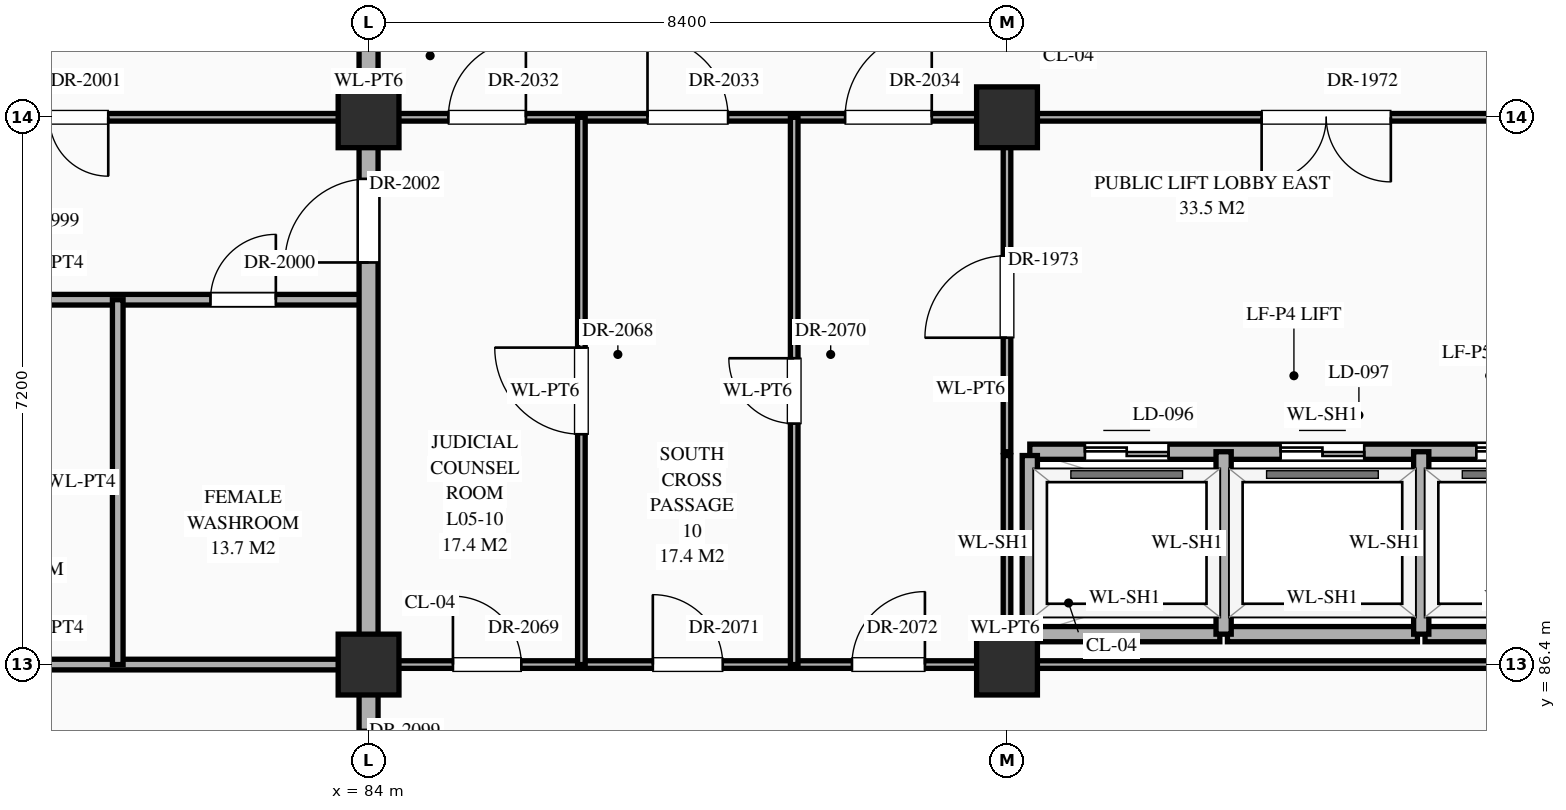
"""IFC4 building model, lengths in metres.
Left out: names, types, materials, properties, quantities, classifications, styles, units other than length and angle.
Written with IfcOpenShell. Run it as: python <this file> out.ifc"""

import sys

from ifc_helpers import new_model, si_unit, direction, frame, frame_2d, origin, origin_2d, place, context, subcontext, project, spatial, rectangle, extrude, element, fill, save


model = new_model("IFC4")
c1 = context("Model", 3, precision=1e-05, world=origin(), true_north=direction((0.0, 1.0)))
c2 = subcontext(c1, "Body", "Model", "MODEL_VIEW")
j1 = project(units=[si_unit("LENGTHUNIT", "METRE"), si_unit("PLANEANGLEUNIT", "RADIAN")], contexts=[c1])
p1 = place(None, origin())
s1 = spatial("IfcSite", under=j1, at=p1, CompositionType="ELEMENT")
p2 = place(p1, origin())
s2 = spatial("IfcBuilding", under=s1, at=p2, CompositionType="ELEMENT")
p3 = place(p2, frame((0.0, 0.0, 21.6)))
s3 = spatial("IfcBuildingStorey", under=s2, at=p3, CompositionType="ELEMENT", Elevation=21.6)
for number, where, z_axis, x_axis in (
    (1, (84.0, 86.4, 0.0), (0.0, 0.0, 1.0), (1.0, 0.0, 0.0)),
    (2, (84.0, 93.6, 0.0), (0.0, 0.0, 1.0), (1.0, 0.0, 0.0)),
    (3, (92.4, 86.4, 0.0), (0.0, 0.0, 1.0), (1.0, 0.0, 0.0)),
    (4, (92.4, 93.6, 0.0), (0.0, 0.0, 1.0), (1.0, 0.0, 0.0)),
):
    element("IfcColumn", number, at=place(p3, frame(where, z_axis=z_axis, x_axis=x_axis)), inside=s3, PredefinedType="COLUMN", context=c2, shape_type="SweptSolid", body=[
        extrude(rectangle(XDim=0.8, YDim=0.8, at=origin_2d()), origin(), (0.0, 0.0, 1.0), 4.5),
    ])
p4 = place(p3, frame((75.6, 86.4, 0.0), z_axis=(0.0, 0.0, 1.0), x_axis=(1.0, 0.0, 0.0)))
e5 = element("IfcWall", 5, at=p4, inside=s3, PredefinedType="STANDARD", context=c2, shape_type="SweptSolid", body=[
    extrude(rectangle(XDim=8.4, YDim=0.14, at=frame_2d((4.2, 0.0))), origin(), (0.0, 0.0, 1.0), 3.39),
])
p5 = place(p3, frame((84.0, 86.4, 0.0), z_axis=(0.0, 0.0, 1.0), x_axis=(1.0, 0.0, 0.0)))
e6 = element("IfcWall", 6, at=p5, inside=s3, PredefinedType="STANDARD", context=c2, shape_type="SweptSolid", body=[
    extrude(rectangle(XDim=8.4, YDim=0.1, at=frame_2d((4.2, 0.0))), origin(), (0.0, 0.0, 1.0), 3.39),
])
p6 = place(p5, frame((1.11, 0.0, 0.0)))
e7 = element("IfcOpeningElement", 7, at=p6, cuts=e6, PredefinedType="OPENING", context=c2, shape_type="SweptSolid", body=[
    extrude(rectangle(XDim=0.9, YDim=2.15, at=frame_2d((0.45, 1.075))), frame((0.0, 0.062, 0.0), z_axis=(0.0, -1.0, 0.0), x_axis=(1.0, 0.0, 0.0)), (0.0, 0.0, 1.0), 0.124),
])
p7 = place(p5, frame((3.74, 0.0, 0.0)))
e8 = element("IfcOpeningElement", 8, at=p7, cuts=e6, PredefinedType="OPENING", context=c2, shape_type="SweptSolid", body=[
    extrude(rectangle(XDim=0.92, YDim=2.15, at=frame_2d((0.46, 1.075))), frame((0.0, 0.062, 0.0), z_axis=(0.0, -1.0, 0.0), x_axis=(1.0, 0.0, 0.0)), (0.0, 0.0, 1.0), 0.124),
])
p8 = place(p5, frame((6.36, 0.0, 0.0)))
e9 = element("IfcOpeningElement", 9, at=p8, cuts=e6, PredefinedType="OPENING", context=c2, shape_type="SweptSolid", body=[
    extrude(rectangle(XDim=0.96, YDim=2.2, at=frame_2d((0.48, 1.1))), frame((0.0, 0.062, 0.0), z_axis=(0.0, -1.0, 0.0), x_axis=(1.0, 0.0, 0.0)), (0.0, 0.0, 1.0), 0.124),
])
p9 = place(p3, frame((92.45, 86.4, 0.0), z_axis=(0.0, 0.0, 1.0), x_axis=(1.0, 0.0, 0.0)))
e10 = element("IfcWall", 10, at=p9, inside=s3, PredefinedType="STANDARD", context=c2, shape_type="SweptSolid", body=[
    extrude(rectangle(XDim=8.3, YDim=0.1, at=frame_2d((4.15, 0.0))), origin(), (0.0, 0.0, 1.0), 3.39),
])
for number, where, z_axis, x_axis in (
    (11, (92.7, 86.8, 0.0), (0.0, 0.0, 1.0), (1.0, 0.0, 0.0)),
    (12, (95.3, 86.8, 0.0), (0.0, 0.0, 1.0), (1.0, 0.0, 0.0)),
    (13, (97.9, 86.8, 0.0), (0.0, 0.0, 1.0), (1.0, 0.0, 0.0)),
):
    element("IfcWall", number, at=place(p3, frame(where, z_axis=z_axis, x_axis=x_axis)), inside=s3, PredefinedType="STANDARD", context=c2, shape_type="SweptSolid", body=[
        extrude(rectangle(XDim=2.5, YDim=0.2, at=frame_2d((1.25, 0.0))), origin(), (0.0, 0.0, 1.0), 4.24),
    ])
p10 = place(p3, frame((92.7, 89.2, 0.0), z_axis=(0.0, 0.0, 1.0), x_axis=(1.0, 0.0, 0.0)))
e14 = element("IfcWall", 14, at=p10, inside=s3, PredefinedType="STANDARD", context=c2, shape_type="SweptSolid", body=[
    extrude(rectangle(XDim=7.7, YDim=0.2, at=frame_2d((3.85, 0.0))), origin(), (0.0, 0.0, 1.0), 4.24),
])
p11 = place(p10, frame((0.725, 0.0, 0.0)))
e15 = element("IfcOpeningElement", 15, at=p11, cuts=e14, PredefinedType="OPENING", context=c2, shape_type="SweptSolid", body=[
    extrude(rectangle(XDim=1.1, YDim=2.15, at=frame_2d((0.55, 1.075))), frame((0.0, 0.112, 0.0), z_axis=(0.0, -1.0, 0.0), x_axis=(1.0, 0.0, 0.0)), (0.0, 0.0, 1.0), 0.224),
])
p12 = place(p10, frame((3.3, 0.0, 0.0)))
e16 = element("IfcOpeningElement", 16, at=p12, cuts=e14, PredefinedType="OPENING", context=c2, shape_type="SweptSolid", body=[
    extrude(rectangle(XDim=1.1, YDim=2.15, at=frame_2d((0.55, 1.075))), frame((0.0, 0.112, 0.0), z_axis=(0.0, -1.0, 0.0), x_axis=(1.0, 0.0, 0.0)), (0.0, 0.0, 1.0), 0.224),
])
p13 = place(p10, frame((5.875, 0.0, 0.0)))
e17 = element("IfcOpeningElement", 17, at=p13, cuts=e14, PredefinedType="OPENING", context=c2, shape_type="SweptSolid", body=[
    extrude(rectangle(XDim=1.1, YDim=2.15, at=frame_2d((0.55, 1.075))), frame((0.0, 0.112, 0.0), z_axis=(0.0, -1.0, 0.0), x_axis=(1.0, 0.0, 0.0)), (0.0, 0.0, 1.0), 0.224),
])
p14 = place(p3, frame((75.6, 91.2, 0.0), z_axis=(0.0, 0.0, 1.0), x_axis=(1.0, 0.0, 0.0)))
e18 = element("IfcWall", 18, at=p14, inside=s3, PredefinedType="STANDARD", context=c2, shape_type="SweptSolid", body=[
    extrude(rectangle(XDim=8.4, YDim=0.14, at=frame_2d((4.2, 0.0))), origin(), (0.0, 0.0, 1.0), 4.24),
])
p15 = place(p14, frame((0.65, 0.0, 0.0)))
e19 = element("IfcOpeningElement", 19, at=p15, cuts=e18, PredefinedType="OPENING", context=c2, shape_type="SweptSolid", body=[
    extrude(rectangle(XDim=0.9, YDim=2.15, at=frame_2d((0.45, 1.075))), frame((0.0, 0.082, 0.0), z_axis=(0.0, -1.0, 0.0), x_axis=(1.0, 0.0, 0.0)), (0.0, 0.0, 1.0), 0.164),
])
p16 = place(p14, frame((3.22, 0.0, 0.0)))
e20 = element("IfcOpeningElement", 20, at=p16, cuts=e18, PredefinedType="OPENING", context=c2, shape_type="SweptSolid", body=[
    extrude(rectangle(XDim=0.86, YDim=2.1, at=frame_2d((0.43, 1.05))), frame((0.0, 0.082, 0.0), z_axis=(0.0, -1.0, 0.0), x_axis=(1.0, 0.0, 0.0)), (0.0, 0.0, 1.0), 0.164),
])
p17 = place(p14, frame((6.32, 0.0, 0.0)))
e21 = element("IfcOpeningElement", 21, at=p17, cuts=e18, PredefinedType="OPENING", context=c2, shape_type="SweptSolid", body=[
    extrude(rectangle(XDim=0.86, YDim=2.1, at=frame_2d((0.43, 1.05))), frame((0.0, 0.082, 0.0), z_axis=(0.0, -1.0, 0.0), x_axis=(1.0, 0.0, 0.0)), (0.0, 0.0, 1.0), 0.164),
])
p18 = place(p3, frame((67.2, 93.6, 0.0), z_axis=(0.0, 0.0, 1.0), x_axis=(1.0, 0.0, 0.0)))
e22 = element("IfcWall", 22, at=p18, inside=s3, PredefinedType="STANDARD", context=c2, shape_type="SweptSolid", body=[
    extrude(rectangle(XDim=33.6, YDim=0.1, at=frame_2d((16.8, 0.0))), origin(), (0.0, 0.0, 1.0), 3.39),
])
p19 = place(p18, frame((3.425, 0.0, 0.0)))
e23 = element("IfcOpeningElement", 23, at=p19, cuts=e22, PredefinedType="OPENING", context=c2, shape_type="SweptSolid", body=[
    extrude(rectangle(XDim=1.55, YDim=2.35, at=frame_2d((0.775, 1.175))), frame((0.0, 0.062, 0.0), z_axis=(0.0, -1.0, 0.0), x_axis=(1.0, 0.0, 0.0)), (0.0, 0.0, 1.0), 0.124),
])
p20 = place(p18, frame((28.55, 0.0, 0.0)))
e24 = element("IfcOpeningElement", 24, at=p20, cuts=e22, PredefinedType="OPENING", context=c2, shape_type="SweptSolid", body=[
    extrude(rectangle(XDim=1.7, YDim=2.45, at=frame_2d((0.85, 1.225))), frame((0.0, 0.062, 0.0), z_axis=(0.0, -1.0, 0.0), x_axis=(1.0, 0.0, 0.0)), (0.0, 0.0, 1.0), 0.124),
])
p21 = place(p18, frame((11.825, 0.0, 0.0)))
e25 = element("IfcOpeningElement", 25, at=p21, cuts=e22, PredefinedType="OPENING", context=c2, shape_type="SweptSolid", body=[
    extrude(rectangle(XDim=1.55, YDim=2.35, at=frame_2d((0.775, 1.175))), frame((0.0, 0.062, 0.0), z_axis=(0.0, -1.0, 0.0), x_axis=(1.0, 0.0, 0.0)), (0.0, 0.0, 1.0), 0.124),
])
p22 = place(p18, frame((17.85, 0.0, 0.0)))
e26 = element("IfcOpeningElement", 26, at=p22, cuts=e22, PredefinedType="OPENING", context=c2, shape_type="SweptSolid", body=[
    extrude(rectangle(XDim=1.02, YDim=2.4, at=frame_2d((0.51, 1.2))), frame((0.0, 0.062, 0.0), z_axis=(0.0, -1.0, 0.0), x_axis=(1.0, 0.0, 0.0)), (0.0, 0.0, 1.0), 0.124),
])
p23 = place(p18, frame((20.47, 0.0, 0.0)))
e27 = element("IfcOpeningElement", 27, at=p23, cuts=e22, PredefinedType="OPENING", context=c2, shape_type="SweptSolid", body=[
    extrude(rectangle(XDim=1.06, YDim=2.4, at=frame_2d((0.53, 1.2))), frame((0.0, 0.062, 0.0), z_axis=(0.0, -1.0, 0.0), x_axis=(1.0, 0.0, 0.0)), (0.0, 0.0, 1.0), 0.124),
])
p24 = place(p18, frame((23.07, 0.0, 0.0)))
e28 = element("IfcOpeningElement", 28, at=p24, cuts=e22, PredefinedType="OPENING", context=c2, shape_type="SweptSolid", body=[
    extrude(rectangle(XDim=1.14, YDim=2.4, at=frame_2d((0.57, 1.2))), frame((0.0, 0.062, 0.0), z_axis=(0.0, -1.0, 0.0), x_axis=(1.0, 0.0, 0.0)), (0.0, 0.0, 1.0), 0.124),
])
p25 = place(p3, frame((80.7, 86.4, 0.0), z_axis=(0.0, 0.0, 1.0), x_axis=(0.0, 1.0, 0.0)))
e29 = element("IfcWall", 29, at=p25, inside=s3, PredefinedType="STANDARD", context=c2, shape_type="SweptSolid", body=[
    extrude(rectangle(XDim=4.8, YDim=0.14, at=frame_2d((2.4, 0.0))), origin(), (0.0, 0.0, 1.0), 4.24),
])
p26 = place(p3, frame((84.0, 79.24, 0.0), z_axis=(0.0, 0.0, 1.0), x_axis=(0.0, 1.0, 0.0)))
e30 = element("IfcWall", 30, at=p26, inside=s3, PredefinedType="STANDARD", context=c2, shape_type="SweptSolid", body=[
    extrude(rectangle(XDim=35.92, YDim=0.25, at=frame_2d((17.96, 0.0))), origin(), (0.0, 0.0, 1.0), 3.49),
])
p27 = place(p26, frame((22.72, 0.0, 0.0)))
e31 = element("IfcOpeningElement", 31, at=p27, cuts=e30, PredefinedType="OPENING", context=c2, shape_type="SweptSolid", body=[
    extrude(rectangle(XDim=1.6, YDim=2.3, at=frame_2d((0.8, 1.15))), frame((0.0, 0.137, 0.0), z_axis=(0.0, -1.0, 0.0), x_axis=(1.0, 0.0, 0.0)), (0.0, 0.0, 1.0), 0.274),
])
p28 = place(p26, frame((12.45, 0.0, 0.0)))
e32 = element("IfcOpeningElement", 32, at=p28, cuts=e30, PredefinedType="OPENING", context=c2, shape_type="SweptSolid", body=[
    extrude(rectangle(XDim=1.1, YDim=2.2, at=frame_2d((0.55, 1.1))), frame((0.0, 0.137, 0.0), z_axis=(0.0, -1.0, 0.0), x_axis=(1.0, 0.0, 0.0)), (0.0, 0.0, 1.0), 0.274),
])
p29 = place(p26, frame((15.245, 0.0, 0.0)))
e33 = element("IfcOpeningElement", 33, at=p29, cuts=e30, PredefinedType="OPENING", context=c2, shape_type="SweptSolid", body=[
    extrude(rectangle(XDim=0.95, YDim=2.15, at=frame_2d((0.475, 1.075))), frame((0.0, 0.137, 0.0), z_axis=(0.0, -1.0, 0.0), x_axis=(1.0, 0.0, 0.0)), (0.0, 0.0, 1.0), 0.274),
])
p30 = place(p26, frame((25.9, 0.0, 0.0)))
e34 = element("IfcOpeningElement", 34, at=p30, cuts=e30, PredefinedType="OPENING", context=c2, shape_type="SweptSolid", body=[
    extrude(rectangle(XDim=1.8, YDim=2.35, at=frame_2d((0.9, 1.175))), frame((0.0, 0.137, 0.0), z_axis=(0.0, -1.0, 0.0), x_axis=(1.0, 0.0, 0.0)), (0.0, 0.0, 1.0), 0.274),
])
p31 = place(p26, frame((29.62, 0.0, 0.0)))
e35 = element("IfcOpeningElement", 35, at=p31, cuts=e30, PredefinedType="OPENING", context=c2, shape_type="SweptSolid", body=[
    extrude(rectangle(XDim=1.0, YDim=2.2, at=frame_2d((0.5, 1.1))), frame((0.0, 0.137, 0.0), z_axis=(0.0, -1.0, 0.0), x_axis=(1.0, 0.0, 0.0)), (0.0, 0.0, 1.0), 0.274),
])
p32 = place(p26, frame((5.3, 0.0, 0.0)))
e36 = element("IfcOpeningElement", 36, at=p32, cuts=e30, PredefinedType="OPENING", context=c2, shape_type="SweptSolid", body=[
    extrude(rectangle(XDim=1.0, YDim=2.2, at=frame_2d((0.5, 1.1))), frame((0.0, 0.137, 0.0), z_axis=(0.0, -1.0, 0.0), x_axis=(1.0, 0.0, 0.0)), (0.0, 0.0, 1.0), 0.274),
])
p33 = place(p3, frame((86.8, 86.4, 0.0), z_axis=(0.0, 0.0, 1.0), x_axis=(0.0, 1.0, 0.0)))
e37 = element("IfcWall", 37, at=p33, inside=s3, PredefinedType="STANDARD", context=c2, shape_type="SweptSolid", body=[
    extrude(rectangle(XDim=7.2, YDim=0.1, at=frame_2d((3.6, 0.0))), origin(), (0.0, 0.0, 1.0), 4.24),
])
p34 = place(p33, frame((3.03, 0.0, 0.0)))
e38 = element("IfcOpeningElement", 38, at=p34, cuts=e37, PredefinedType="OPENING", context=c2, shape_type="SweptSolid", body=[
    extrude(rectangle(XDim=1.14, YDim=2.4, at=frame_2d((0.57, 1.2))), frame((0.0, 0.062, 0.0), z_axis=(0.0, -1.0, 0.0), x_axis=(1.0, 0.0, 0.0)), (0.0, 0.0, 1.0), 0.124),
])
p35 = place(p3, frame((89.6, 86.4, 0.0), z_axis=(0.0, 0.0, 1.0), x_axis=(0.0, 1.0, 0.0)))
e39 = element("IfcWall", 39, at=p35, inside=s3, PredefinedType="STANDARD", context=c2, shape_type="SweptSolid", body=[
    extrude(rectangle(XDim=7.2, YDim=0.1, at=frame_2d((3.6, 0.0))), origin(), (0.0, 0.0, 1.0), 4.24),
])
p36 = place(p35, frame((3.17, 0.0, 0.0)))
e40 = element("IfcOpeningElement", 40, at=p36, cuts=e39, PredefinedType="OPENING", context=c2, shape_type="SweptSolid", body=[
    extrude(rectangle(XDim=0.86, YDim=2.1, at=frame_2d((0.43, 1.05))), frame((0.0, 0.062, 0.0), z_axis=(0.0, -1.0, 0.0), x_axis=(1.0, 0.0, 0.0)), (0.0, 0.0, 1.0), 0.124),
])
p37 = place(p3, frame((92.4, 86.45, 0.0), z_axis=(0.0, 0.0, 1.0), x_axis=(0.0, 1.0, 0.0)))
e41 = element("IfcWall", 41, at=p37, inside=s3, PredefinedType="STANDARD", context=c2, shape_type="SweptSolid", body=[
    extrude(rectangle(XDim=2.7, YDim=0.1, at=frame_2d((1.35, 0.0))), origin(), (0.0, 0.0, 1.0), 3.49),
])
p38 = place(p3, frame((92.4, 89.2, 0.0), z_axis=(0.0, 0.0, 1.0), x_axis=(0.0, 1.0, 0.0)))
e42 = element("IfcWall", 42, at=p38, inside=s3, PredefinedType="STANDARD", context=c2, shape_type="SweptSolid", body=[
    extrude(rectangle(XDim=4.4, YDim=0.1, at=frame_2d((2.2, 0.0))), origin(), (0.0, 0.0, 1.0), 3.49),
])
p39 = place(p38, frame((1.5, 0.0, 0.0)))
e43 = element("IfcOpeningElement", 43, at=p39, cuts=e42, PredefinedType="OPENING", context=c2, shape_type="SweptSolid", body=[
    extrude(rectangle(XDim=1.08, YDim=2.25, at=frame_2d((0.54, 1.125))), frame((0.0, 0.062, 0.0), z_axis=(0.0, -1.0, 0.0), x_axis=(1.0, 0.0, 0.0)), (0.0, 0.0, 1.0), 0.124),
])
p40 = place(p3, frame((92.7, 86.85, 0.0), z_axis=(0.0, 0.0, 1.0), x_axis=(0.0, 1.0, 0.0)))
e44 = element("IfcWall", 44, at=p40, inside=s3, PredefinedType="STANDARD", context=c2, shape_type="SweptSolid", body=[
    extrude(rectangle(XDim=2.3, YDim=0.2, at=frame_2d((1.15, 0.0))), origin(), (0.0, 0.0, 1.0), 4.24),
])
for number, where, z_axis, x_axis in (
    (45, (95.25, 86.8, 0.0), (0.0, 0.0, 1.0), (0.0, 1.0, 0.0)),
    (46, (97.85, 86.8, 0.0), (0.0, 0.0, 1.0), (0.0, 1.0, 0.0)),
):
    element("IfcWall", number, at=place(p3, frame(where, z_axis=z_axis, x_axis=x_axis)), inside=s3, PredefinedType="STANDARD", context=c2, shape_type="SweptSolid", body=[
        extrude(rectangle(XDim=2.4, YDim=0.2, at=frame_2d((1.2, 0.0))), origin(), (0.0, 0.0, 1.0), 4.24),
    ])
p41 = place(p11, origin())
e47 = element("IfcDoor", 47, at=p41, inside=s3, OperationType="DOUBLE_DOOR_SLIDING", PredefinedType="DOOR", context=c2, shape_type="SweptSolid", body=[
    extrude(rectangle(XDim=1.1, YDim=2.15, at=frame_2d((0.55, 1.075))), frame((0.0, 0.025, 0.0), z_axis=(0.0, -1.0, 0.0), x_axis=(1.0, 0.0, 0.0)), (0.0, 0.0, 1.0), 0.05),
])
fill(e15, e47)
p42 = place(p12, origin())
e48 = element("IfcDoor", 48, at=p42, inside=s3, OperationType="DOUBLE_DOOR_SLIDING", PredefinedType="DOOR", context=c2, shape_type="SweptSolid", body=[
    extrude(rectangle(XDim=1.1, YDim=2.15, at=frame_2d((0.55, 1.075))), frame((0.0, 0.025, 0.0), z_axis=(0.0, -1.0, 0.0), x_axis=(1.0, 0.0, 0.0)), (0.0, 0.0, 1.0), 0.05),
])
fill(e16, e48)
p43 = place(p13, origin())
e49 = element("IfcDoor", 49, at=p43, inside=s3, OperationType="DOUBLE_DOOR_SLIDING", PredefinedType="DOOR", context=c2, shape_type="SweptSolid", body=[
    extrude(rectangle(XDim=1.1, YDim=2.15, at=frame_2d((0.55, 1.075))), frame((0.0, 0.025, 0.0), z_axis=(0.0, -1.0, 0.0), x_axis=(1.0, 0.0, 0.0)), (0.0, 0.0, 1.0), 0.05),
])
fill(e17, e49)
p44 = place(p20, frame((1.7, 0.0, 0.0), z_axis=(0.0, 0.0, 1.0), x_axis=(-1.0, 0.0, 0.0)))
e50 = element("IfcDoor", 50, at=p44, inside=s3, OperationType="DOUBLE_DOOR_SINGLE_SWING", PredefinedType="DOOR", context=c2, shape_type="SweptSolid", body=[
    extrude(rectangle(XDim=1.7, YDim=2.45, at=frame_2d((0.85, 1.225))), frame((0.0, 0.025, 0.0), z_axis=(0.0, -1.0, 0.0), x_axis=(1.0, 0.0, 0.0)), (0.0, 0.0, 1.0), 0.05),
])
fill(e24, e50)
p45 = place(p39, origin())
e51 = element("IfcDoor", 51, at=p45, inside=s3, OperationType="SINGLE_SWING_LEFT", PredefinedType="DOOR", context=c2, shape_type="SweptSolid", body=[
    extrude(rectangle(XDim=1.08, YDim=2.25, at=frame_2d((0.54, 1.125))), frame((0.0, 0.025, 0.0), z_axis=(0.0, -1.0, 0.0), x_axis=(1.0, 0.0, 0.0)), (0.0, 0.0, 1.0), 0.05),
])
fill(e43, e51)
p46 = place(p17, origin())
e52 = element("IfcDoor", 52, at=p46, inside=s3, OperationType="SINGLE_SWING_RIGHT", PredefinedType="DOOR", context=c2, shape_type="SweptSolid", body=[
    extrude(rectangle(XDim=0.86, YDim=2.1, at=frame_2d((0.43, 1.05))), frame((0.0, 0.025, 0.0), z_axis=(0.0, -1.0, 0.0), x_axis=(1.0, 0.0, 0.0)), (0.0, 0.0, 1.0), 0.05),
])
fill(e21, e52)
p47 = place(p21, frame((1.55, 0.0, 0.0), z_axis=(0.0, 0.0, 1.0), x_axis=(-1.0, 0.0, 0.0)))
e53 = element("IfcDoor", 53, at=p47, inside=s3, OperationType="DOUBLE_DOOR_SINGLE_SWING", PredefinedType="DOOR", context=c2, shape_type="SweptSolid", body=[
    extrude(rectangle(XDim=1.55, YDim=2.35, at=frame_2d((0.775, 1.175))), frame((0.0, 0.025, 0.0), z_axis=(0.0, -1.0, 0.0), x_axis=(1.0, 0.0, 0.0)), (0.0, 0.0, 1.0), 0.05),
])
fill(e25, e53)
p48 = place(p28, origin())
e54 = element("IfcDoor", 54, at=p48, inside=s3, OperationType="SINGLE_SWING_LEFT", PredefinedType="DOOR", context=c2, shape_type="SweptSolid", body=[
    extrude(rectangle(XDim=1.1, YDim=2.2, at=frame_2d((0.55, 1.1))), frame((0.0, 0.025, 0.0), z_axis=(0.0, -1.0, 0.0), x_axis=(1.0, 0.0, 0.0)), (0.0, 0.0, 1.0), 0.05),
])
fill(e32, e54)
p49 = place(p22, origin())
e55 = element("IfcDoor", 55, at=p49, inside=s3, OperationType="SINGLE_SWING_RIGHT", PredefinedType="DOOR", context=c2, shape_type="SweptSolid", body=[
    extrude(rectangle(XDim=1.02, YDim=2.4, at=frame_2d((0.51, 1.2))), frame((0.0, 0.025, 0.0), z_axis=(0.0, -1.0, 0.0), x_axis=(1.0, 0.0, 0.0)), (0.0, 0.0, 1.0), 0.05),
])
fill(e26, e55)
p50 = place(p23, origin())
e56 = element("IfcDoor", 56, at=p50, inside=s3, OperationType="SINGLE_SWING_LEFT", PredefinedType="DOOR", context=c2, shape_type="SweptSolid", body=[
    extrude(rectangle(XDim=1.06, YDim=2.4, at=frame_2d((0.53, 1.2))), frame((0.0, 0.025, 0.0), z_axis=(0.0, -1.0, 0.0), x_axis=(1.0, 0.0, 0.0)), (0.0, 0.0, 1.0), 0.05),
])
fill(e27, e56)
p51 = place(p24, origin())
e57 = element("IfcDoor", 57, at=p51, inside=s3, OperationType="SINGLE_SWING_RIGHT", PredefinedType="DOOR", context=c2, shape_type="SweptSolid", body=[
    extrude(rectangle(XDim=1.14, YDim=2.4, at=frame_2d((0.57, 1.2))), frame((0.0, 0.025, 0.0), z_axis=(0.0, -1.0, 0.0), x_axis=(1.0, 0.0, 0.0)), (0.0, 0.0, 1.0), 0.05),
])
fill(e28, e57)
p52 = place(p34, origin())
e58 = element("IfcDoor", 58, at=p52, inside=s3, OperationType="SINGLE_SWING_RIGHT", PredefinedType="DOOR", context=c2, shape_type="SweptSolid", body=[
    extrude(rectangle(XDim=1.14, YDim=2.4, at=frame_2d((0.57, 1.2))), frame((0.0, 0.025, 0.0), z_axis=(0.0, -1.0, 0.0), x_axis=(1.0, 0.0, 0.0)), (0.0, 0.0, 1.0), 0.05),
])
fill(e38, e58)
p53 = place(p6, origin())
e59 = element("IfcDoor", 59, at=p53, inside=s3, OperationType="SINGLE_SWING_LEFT", PredefinedType="DOOR", context=c2, shape_type="SweptSolid", body=[
    extrude(rectangle(XDim=0.9, YDim=2.15, at=frame_2d((0.45, 1.075))), frame((0.0, 0.025, 0.0), z_axis=(0.0, -1.0, 0.0), x_axis=(1.0, 0.0, 0.0)), (0.0, 0.0, 1.0), 0.05),
])
fill(e7, e59)
p54 = place(p36, origin())
e60 = element("IfcDoor", 60, at=p54, inside=s3, OperationType="SINGLE_SWING_RIGHT", PredefinedType="DOOR", context=c2, shape_type="SweptSolid", body=[
    extrude(rectangle(XDim=0.86, YDim=2.1, at=frame_2d((0.43, 1.05))), frame((0.0, 0.025, 0.0), z_axis=(0.0, -1.0, 0.0), x_axis=(1.0, 0.0, 0.0)), (0.0, 0.0, 1.0), 0.05),
])
fill(e40, e60)
p55 = place(p7, origin())
e61 = element("IfcDoor", 61, at=p55, inside=s3, OperationType="SINGLE_SWING_LEFT", PredefinedType="DOOR", context=c2, shape_type="SweptSolid", body=[
    extrude(rectangle(XDim=0.92, YDim=2.15, at=frame_2d((0.46, 1.075))), frame((0.0, 0.025, 0.0), z_axis=(0.0, -1.0, 0.0), x_axis=(1.0, 0.0, 0.0)), (0.0, 0.0, 1.0), 0.05),
])
fill(e8, e61)
p56 = place(p8, origin())
e62 = element("IfcDoor", 62, at=p56, inside=s3, OperationType="SINGLE_SWING_RIGHT", PredefinedType="DOOR", context=c2, shape_type="SweptSolid", body=[
    extrude(rectangle(XDim=0.96, YDim=2.2, at=frame_2d((0.48, 1.1))), frame((0.0, 0.025, 0.0), z_axis=(0.0, -1.0, 0.0), x_axis=(1.0, 0.0, 0.0)), (0.0, 0.0, 1.0), 0.05),
])
fill(e9, e62)
save(model, sys.argv[1])
